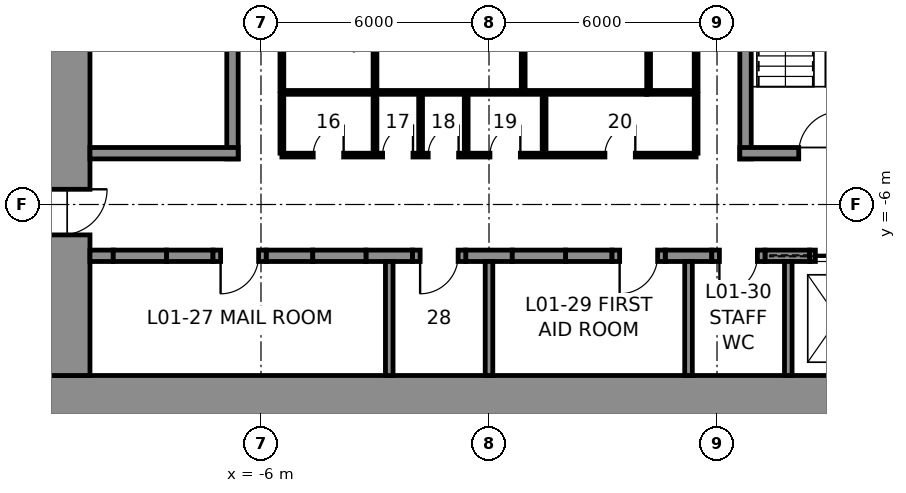
"""IFC4 building model, lengths in metres.
Left out: names, types, materials, properties, quantities, classifications, styles, units other than length and angle.
Written with IfcOpenShell. Run it as: python <this file> out.ifc"""

import sys

from ifc_helpers import new_model, si_unit, direction, frame, frame_2d, origin, place, context, subcontext, project, spatial, rectangle, extrude, element, fill, save


model = new_model("IFC4")
c1 = context("Model", 3, precision=1e-05, world=origin(), true_north=direction((0.0, 1.0)))
c2 = subcontext(c1, "Body", "Model", "MODEL_VIEW")
j1 = project(units=[si_unit("LENGTHUNIT", "METRE"), si_unit("PLANEANGLEUNIT", "RADIAN")], contexts=[c1])
p1 = place(None, origin())
s1 = spatial("IfcSite", under=j1, at=p1, CompositionType="ELEMENT")
p2 = place(p1, origin())
s2 = spatial("IfcBuilding", under=s1, at=p2, CompositionType="ELEMENT")
p3 = place(p2, frame((0.0, 0.0, 6.0)))
s3 = spatial("IfcBuildingStorey", under=s2, at=p3, CompositionType="ELEMENT", Elevation=6.0)
p4 = place(p3, frame((12.0, -11.25, 0.0), z_axis=(0.0, 0.0, 1.0), x_axis=(-1.0, 0.0, 0.0)))
e1 = element("IfcWall", 1, at=p4, inside=s3, PredefinedType="SHEAR", context=c2, shape_type="SweptSolid", body=[
    extrude(rectangle(XDim=24.0, YDim=1.5, at=frame_2d((12.0, 0.0))), origin(), (0.0, 0.0, 1.0), 5.0),
])
p5 = place(p3, frame((-11.25, -10.5, 0.0), z_axis=(0.0, 0.0, 1.0), x_axis=(0.0, 1.0, 0.0)))
e2 = element("IfcWall", 2, at=p5, inside=s3, PredefinedType="SHEAR", context=c2, shape_type="SweptSolid", body=[
    extrude(rectangle(XDim=21.0, YDim=1.5, at=frame_2d((10.5, 0.0))), origin(), (0.0, 0.0, 1.0), 5.0),
])
p6 = place(p5, frame((16.1, 0.0, 0.0)))
e3 = element("IfcOpeningElement", 3, at=p6, cuts=e2, PredefinedType="OPENING", context=c2, shape_type="SweptSolid", body=[
    extrude(rectangle(XDim=1.2, YDim=2.3, at=frame_2d((0.6, 1.15))), frame((0.0, 0.76, 0.0), z_axis=(0.0, -1.0, 0.0), x_axis=(1.0, 0.0, 0.0)), (0.0, 0.0, 1.0), 1.52),
])
p7 = place(p5, frame((3.7, 0.0, 0.0)))
e4 = element("IfcOpeningElement", 4, at=p7, cuts=e2, PredefinedType="OPENING", context=c2, shape_type="SweptSolid", body=[
    extrude(rectangle(XDim=1.2, YDim=2.3, at=frame_2d((0.6, 1.15))), frame((0.0, 0.76, 0.0), z_axis=(0.0, -1.0, 0.0), x_axis=(1.0, 0.0, 0.0)), (0.0, 0.0, 1.0), 1.52),
])
p8 = place(p3, frame((-10.5, -7.35, 0.0), z_axis=(0.0, 0.0, 1.0), x_axis=(1.0, 0.0, 0.0)))
e5 = element("IfcWall", 5, at=p8, inside=s3, PredefinedType="SHEAR", context=c2, shape_type="SweptSolid", body=[
    extrude(rectangle(XDim=0.613, YDim=0.3, at=frame_2d((0.306, 0.0))), origin(), (0.0, 0.0, 1.0), 5.0),
])
for number, where, z_axis, x_axis in (
    (6, (-8.488, -7.35, 0.0), (0.0, 0.0, 1.0), (1.0, 0.0, 0.0)),
    (7, (-5.863, -7.35, 0.0), (0.0, 0.0, 1.0), (1.0, 0.0, 0.0)),
    (8, (-3.238, -7.35, 0.0), (0.0, 0.0, 1.0), (1.0, 0.0, 0.0)),
    (9, (-0.613, -7.35, 0.0), (0.0, 0.0, 1.0), (1.0, 0.0, 0.0)),
    (10, (2.012, -7.35, 0.0), (0.0, 0.0, 1.0), (1.0, 0.0, 0.0)),
    (11, (4.637, -7.35, 0.0), (0.0, 0.0, 1.0), (1.0, 0.0, 0.0)),
):
    element("IfcWall", number, at=place(p3, frame(where, z_axis=z_axis, x_axis=x_axis)), inside=s3, PredefinedType="SHEAR", context=c2, shape_type="SweptSolid", body=[
        extrude(rectangle(XDim=1.225, YDim=0.3, at=frame_2d((0.613, 0.0))), origin(), (0.0, 0.0, 1.0), 5.0),
    ])
p9 = place(p3, frame((7.262, -7.35, 0.0), z_axis=(0.0, 0.0, 1.0), x_axis=(1.0, 0.0, 0.0)))
e12 = element("IfcWall", 12, at=p9, inside=s3, PredefinedType="SHEAR", context=c2, shape_type="SweptSolid", body=[
    extrude(rectangle(XDim=1.175, YDim=0.3, at=frame_2d((0.587, 0.0))), origin(), (0.0, 0.0, 1.0), 5.0),
])
p10 = place(p3, frame((-9.887, -7.35, 0.0), z_axis=(0.0, 0.0, 1.0), x_axis=(1.0, 0.0, 0.0)))
e13 = element("IfcWall", 13, at=p10, inside=s3, PredefinedType="PARTITIONING", context=c2, shape_type="SweptSolid", body=[
    extrude(rectangle(XDim=1.4, YDim=0.3, at=frame_2d((0.7, 0.0))), origin(), (0.0, 0.0, 1.0), 5.0),
])
p11 = place(p3, frame((-7.262, -7.35, 0.0), z_axis=(0.0, 0.0, 1.0), x_axis=(1.0, 0.0, 0.0)))
e14 = element("IfcWall", 14, at=p11, inside=s3, PredefinedType="PARTITIONING", context=c2, shape_type="SweptSolid", body=[
    extrude(rectangle(XDim=1.4, YDim=0.3, at=frame_2d((0.7, 0.0))), origin(), (0.0, 0.0, 1.0), 5.0),
])
p12 = place(p11, frame((0.2, 0.0, 0.0)))
e15 = element("IfcOpeningElement", 15, at=p12, cuts=e14, PredefinedType="OPENING", context=c2, shape_type="SweptSolid", body=[
    extrude(rectangle(XDim=1.0, YDim=2.3, at=frame_2d((0.5, 1.15))), frame((0.0, 0.16, 0.0), z_axis=(0.0, -1.0, 0.0), x_axis=(1.0, 0.0, 0.0)), (0.0, 0.0, 1.0), 0.32),
])
p13 = place(p3, frame((-4.637, -7.35, 0.0), z_axis=(0.0, 0.0, 1.0), x_axis=(1.0, 0.0, 0.0)))
e16 = element("IfcWall", 16, at=p13, inside=s3, PredefinedType="PARTITIONING", context=c2, shape_type="SweptSolid", body=[
    extrude(rectangle(XDim=1.4, YDim=0.3, at=frame_2d((0.7, 0.0))), origin(), (0.0, 0.0, 1.0), 5.0),
])
p14 = place(p3, frame((-2.012, -7.35, 0.0), z_axis=(0.0, 0.0, 1.0), x_axis=(1.0, 0.0, 0.0)))
e17 = element("IfcWall", 17, at=p14, inside=s3, PredefinedType="PARTITIONING", context=c2, shape_type="SweptSolid", body=[
    extrude(rectangle(XDim=1.4, YDim=0.3, at=frame_2d((0.7, 0.0))), origin(), (0.0, 0.0, 1.0), 5.0),
])
p15 = place(p14, frame((0.2, 0.0, 0.0)))
e18 = element("IfcOpeningElement", 18, at=p15, cuts=e17, PredefinedType="OPENING", context=c2, shape_type="SweptSolid", body=[
    extrude(rectangle(XDim=1.0, YDim=2.3, at=frame_2d((0.5, 1.15))), frame((0.0, 0.16, 0.0), z_axis=(0.0, -1.0, 0.0), x_axis=(1.0, 0.0, 0.0)), (0.0, 0.0, 1.0), 0.32),
])
p16 = place(p3, frame((0.613, -7.35, 0.0), z_axis=(0.0, 0.0, 1.0), x_axis=(1.0, 0.0, 0.0)))
e19 = element("IfcWall", 19, at=p16, inside=s3, PredefinedType="PARTITIONING", context=c2, shape_type="SweptSolid", body=[
    extrude(rectangle(XDim=1.4, YDim=0.3, at=frame_2d((0.7, 0.0))), origin(), (0.0, 0.0, 1.0), 5.0),
])
p17 = place(p3, frame((3.238, -7.35, 0.0), z_axis=(0.0, 0.0, 1.0), x_axis=(1.0, 0.0, 0.0)))
e20 = element("IfcWall", 20, at=p17, inside=s3, PredefinedType="PARTITIONING", context=c2, shape_type="SweptSolid", body=[
    extrude(rectangle(XDim=1.4, YDim=0.3, at=frame_2d((0.7, 0.0))), origin(), (0.0, 0.0, 1.0), 5.0),
])
p18 = place(p17, frame((0.2, 0.0, 0.0)))
e21 = element("IfcOpeningElement", 21, at=p18, cuts=e20, PredefinedType="OPENING", context=c2, shape_type="SweptSolid", body=[
    extrude(rectangle(XDim=1.0, YDim=2.3, at=frame_2d((0.5, 1.15))), frame((0.0, 0.16, 0.0), z_axis=(0.0, -1.0, 0.0), x_axis=(1.0, 0.0, 0.0)), (0.0, 0.0, 1.0), 0.32),
])
p19 = place(p3, frame((5.863, -7.35, 0.0), z_axis=(0.0, 0.0, 1.0), x_axis=(1.0, 0.0, 0.0)))
e22 = element("IfcWall", 22, at=p19, inside=s3, PredefinedType="PARTITIONING", context=c2, shape_type="SweptSolid", body=[
    extrude(rectangle(XDim=1.4, YDim=0.3, at=frame_2d((0.7, 0.0))), origin(), (0.0, 0.0, 1.0), 5.0),
])
p20 = place(p19, frame((0.2, 0.0, 0.0)))
e23 = element("IfcOpeningElement", 23, at=p20, cuts=e22, PredefinedType="OPENING", context=c2, shape_type="SweptSolid", body=[
    extrude(rectangle(XDim=1.0, YDim=2.3, at=frame_2d((0.5, 1.15))), frame((0.0, 0.16, 0.0), z_axis=(0.0, -1.0, 0.0), x_axis=(1.0, 0.0, 0.0)), (0.0, 0.0, 1.0), 0.32),
])
p21 = place(p3, frame((8.438, -7.35, 0.0), z_axis=(0.0, 0.0, 1.0), x_axis=(1.0, 0.0, 0.0)))
e24 = element("IfcWall", 24, at=p21, inside=s3, PredefinedType="PARTITIONING", context=c2, shape_type="SweptSolid", body=[
    extrude(rectangle(XDim=1.5, YDim=0.3, at=frame_2d((0.75, 0.0))), origin(), (0.0, 0.0, 1.0), 5.0),
])
p22 = place(p21, frame((0.15, 0.0, 0.0)))
e25 = element("IfcOpeningElement", 25, at=p22, cuts=e24, PredefinedType="OPENING", context=c2, shape_type="SweptSolid", body=[
    extrude(rectangle(XDim=1.2, YDim=2.3, at=frame_2d((0.6, 1.15))), frame((0.0, 0.16, 0.0), z_axis=(0.0, -1.0, 0.0), x_axis=(1.0, 0.0, 0.0)), (0.0, 0.0, 1.0), 0.32),
])
for number, where, z_axis, x_axis in (
    (26, (-2.625, -10.5, 0.0), (0.0, 0.0, 1.0), (0.0, 1.0, 0.0)),
    (27, (0.0, -10.5, 0.0), (0.0, 0.0, 1.0), (0.0, 1.0, 0.0)),
    (28, (5.25, -10.5, 0.0), (0.0, 0.0, 1.0), (0.0, 1.0, 0.0)),
    (29, (7.875, -10.5, 0.0), (0.0, 0.0, 1.0), (0.0, 1.0, 0.0)),
):
    element("IfcWall", number, at=place(p3, frame(where, z_axis=z_axis, x_axis=x_axis)), inside=s3, PredefinedType="PARTITIONING", context=c2, shape_type="SweptSolid", body=[
        extrude(rectangle(XDim=3.0, YDim=0.2, at=frame_2d((1.5, 0.0))), origin(), (0.0, 0.0, 1.0), 5.0),
    ])
p23 = place(p3, frame((-6.75, -4.8, 0.0), z_axis=(0.0, 0.0, 1.0), x_axis=(0.0, 1.0, 0.0)))
e30 = element("IfcWall", 30, at=p23, inside=s3, PredefinedType="SOLIDWALL", context=c2, shape_type="SweptSolid", body=[
    extrude(rectangle(XDim=9.6, YDim=0.3, at=frame_2d((4.8, 0.0))), origin(), (0.0, 0.0, 1.0), 4.75),
])
p24 = place(p3, frame((-6.6, -4.65, 0.0), z_axis=(0.0, 0.0, 1.0), x_axis=(-1.0, 0.0, 0.0)))
e31 = element("IfcWall", 31, at=p24, inside=s3, PredefinedType="SOLIDWALL", context=c2, shape_type="SweptSolid", body=[
    extrude(rectangle(XDim=3.9, YDim=0.3, at=frame_2d((1.95, 0.0))), origin(), (0.0, 0.0, 1.0), 4.75),
])
p25 = place(p3, frame((6.75, -4.8, 0.0), z_axis=(0.0, 0.0, 1.0), x_axis=(0.0, 1.0, 0.0)))
e32 = element("IfcWall", 32, at=p25, inside=s3, PredefinedType="SOLIDWALL", context=c2, shape_type="SweptSolid", body=[
    extrude(rectangle(XDim=9.6, YDim=0.3, at=frame_2d((4.8, 0.0))), origin(), (0.0, 0.0, 1.0), 4.75),
])
p26 = place(p3, frame((10.5, -4.65, 0.0), z_axis=(0.0, 0.0, 1.0), x_axis=(-1.0, 0.0, 0.0)))
e33 = element("IfcWall", 33, at=p26, inside=s3, PredefinedType="SOLIDWALL", context=c2, shape_type="SweptSolid", body=[
    extrude(rectangle(XDim=3.9, YDim=0.3, at=frame_2d((1.95, 0.0))), origin(), (0.0, 0.0, 1.0), 4.75),
])
p27 = place(p26, frame((1.25, 0.0, 0.0)))
e34 = element("IfcOpeningElement", 34, at=p27, cuts=e33, PredefinedType="OPENING", context=c2, shape_type="SweptSolid", body=[
    extrude(rectangle(XDim=1.1, YDim=2.3, at=frame_2d((0.55, 1.15))), frame((0.0, 0.16, 0.0), z_axis=(0.0, -1.0, 0.0), x_axis=(1.0, 0.0, 0.0)), (0.0, 0.0, 1.0), 0.32),
])
p28 = place(p3, frame((4.15, -3.05, 0.0), z_axis=(0.0, 0.0, 1.0), x_axis=(-1.0, 0.0, 0.0)))
e35 = element("IfcWall", 35, at=p28, inside=s3, PredefinedType="PARTITIONING", context=c2, shape_type="SweptSolid", body=[
    extrude(rectangle(XDim=9.6, YDim=0.1, at=frame_2d((4.8, 0.0))), origin(), (0.0, 0.0, 1.0), 4.75),
])
p29 = place(p3, frame((5.45, -3.05, 0.0), z_axis=(0.0, 0.0, 1.0), x_axis=(-1.0, 0.0, 0.0)))
e36 = element("IfcWall", 36, at=p29, inside=s3, PredefinedType="PARTITIONING", context=c2, shape_type="SweptSolid", body=[
    extrude(rectangle(XDim=1.3, YDim=0.1, at=frame_2d((0.65, 0.0))), origin(), (0.0, 0.0, 1.0), 4.75),
])
for number, where, z_axis, x_axis in (
    (37, (5.45, 3.0, 0.0), (0.0, 0.0, 1.0), (0.0, -1.0, 0.0)),
    (38, (-5.45, -3.0, 0.0), (0.0, 0.0, 1.0), (0.0, 1.0, 0.0)),
    (39, (-3.0, -3.0, 0.0), (0.0, 0.0, 1.0), (0.0, 1.0, 0.0)),
    (40, (0.9, -3.0, 0.0), (0.0, 0.0, 1.0), (0.0, 1.0, 0.0)),
    (41, (4.2, -3.0, 0.0), (0.0, 0.0, 1.0), (0.0, 1.0, 0.0)),
):
    element("IfcWall", number, at=place(p3, frame(where, z_axis=z_axis, x_axis=x_axis)), inside=s3, PredefinedType="PARTITIONING", context=c2, shape_type="SweptSolid", body=[
        extrude(rectangle(XDim=6.0, YDim=0.1, at=frame_2d((3.0, 0.0))), origin(), (0.0, 0.0, 1.0), 4.75),
    ])
p30 = place(p3, frame((5.45, -4.7, 0.0), z_axis=(0.0, 0.0, 1.0), x_axis=(-1.0, 0.0, 0.0)))
e42 = element("IfcWall", 42, at=p30, inside=s3, PredefinedType="PARTITIONING", context=c2, shape_type="SweptSolid", body=[
    extrude(rectangle(XDim=10.9, YDim=0.1, at=frame_2d((5.45, 0.0))), origin(), (0.0, 0.0, 1.0), 4.75),
])
p31 = place(p30, frame((9.275, 0.0, 0.0)))
e43 = element("IfcOpeningElement", 43, at=p31, cuts=e42, PredefinedType="OPENING", context=c2, shape_type="SweptSolid", body=[
    extrude(rectangle(XDim=0.8, YDim=2.3, at=frame_2d((0.4, 1.15))), frame((0.0, 0.06, 0.0), z_axis=(0.0, -1.0, 0.0), x_axis=(1.0, 0.0, 0.0)), (0.0, 0.0, 1.0), 0.12),
])
p32 = place(p30, frame((7.45, 0.0, 0.0)))
e44 = element("IfcOpeningElement", 44, at=p32, cuts=e42, PredefinedType="OPENING", context=c2, shape_type="SweptSolid", body=[
    extrude(rectangle(XDim=0.8, YDim=2.3, at=frame_2d((0.4, 1.15))), frame((0.0, 0.06, 0.0), z_axis=(0.0, -1.0, 0.0), x_axis=(1.0, 0.0, 0.0)), (0.0, 0.0, 1.0), 0.12),
])
p33 = place(p30, frame((6.25, 0.0, 0.0)))
e45 = element("IfcOpeningElement", 45, at=p33, cuts=e42, PredefinedType="OPENING", context=c2, shape_type="SweptSolid", body=[
    extrude(rectangle(XDim=0.8, YDim=2.3, at=frame_2d((0.4, 1.15))), frame((0.0, 0.06, 0.0), z_axis=(0.0, -1.0, 0.0), x_axis=(1.0, 0.0, 0.0)), (0.0, 0.0, 1.0), 0.12),
])
p34 = place(p30, frame((4.625, 0.0, 0.0)))
e46 = element("IfcOpeningElement", 46, at=p34, cuts=e42, PredefinedType="OPENING", context=c2, shape_type="SweptSolid", body=[
    extrude(rectangle(XDim=0.8, YDim=2.3, at=frame_2d((0.4, 1.15))), frame((0.0, 0.06, 0.0), z_axis=(0.0, -1.0, 0.0), x_axis=(1.0, 0.0, 0.0)), (0.0, 0.0, 1.0), 0.12),
])
p35 = place(p30, frame((1.6, 0.0, 0.0)))
e47 = element("IfcOpeningElement", 47, at=p35, cuts=e42, PredefinedType="OPENING", context=c2, shape_type="SweptSolid", body=[
    extrude(rectangle(XDim=0.8, YDim=2.3, at=frame_2d((0.4, 1.15))), frame((0.0, 0.06, 0.0), z_axis=(0.0, -1.0, 0.0), x_axis=(1.0, 0.0, 0.0)), (0.0, 0.0, 1.0), 0.12),
])
for number, where, z_axis, x_axis in (
    (48, (-5.45, -3.1, 0.0), (0.0, 0.0, 1.0), (0.0, -1.0, 0.0)),
    (49, (5.45, -3.1, 0.0), (0.0, 0.0, 1.0), (0.0, -1.0, 0.0)),
    (50, (-3.0, -3.1, 0.0), (0.0, 0.0, 1.0), (0.0, -1.0, 0.0)),
    (51, (-1.8, -3.1, 0.0), (0.0, 0.0, 1.0), (0.0, -1.0, 0.0)),
    (52, (-0.6, -3.1, 0.0), (0.0, 0.0, 1.0), (0.0, -1.0, 0.0)),
    (53, (1.45, -3.1, 0.0), (0.0, 0.0, 1.0), (0.0, -1.0, 0.0)),
):
    element("IfcWall", number, at=place(p3, frame(where, z_axis=z_axis, x_axis=x_axis)), inside=s3, PredefinedType="PARTITIONING", context=c2, shape_type="SweptSolid", body=[
        extrude(rectangle(XDim=1.55, YDim=0.1, at=frame_2d((0.775, 0.0))), origin(), (0.0, 0.0, 1.0), 4.75),
    ])
p36 = place(p27, frame((1.1, 0.0, 0.0), z_axis=(0.0, 0.0, 1.0), x_axis=(-1.0, 0.0, 0.0)))
e54 = element("IfcDoor", 54, at=p36, inside=s3, OperationType="SINGLE_SWING_RIGHT", PredefinedType="DOOR", context=c2, shape_type="SweptSolid", body=[
    extrude(rectangle(XDim=1.1, YDim=2.3, at=frame_2d((0.55, 1.15))), frame((0.0, 0.025, 0.0), z_axis=(0.0, -1.0, 0.0), x_axis=(1.0, 0.0, 0.0)), (0.0, 0.0, 1.0), 0.05),
])
fill(e34, e54)
p37 = place(p31, frame((0.8, 0.0, 0.0), z_axis=(0.0, 0.0, 1.0), x_axis=(-1.0, 0.0, 0.0)))
e55 = element("IfcDoor", 55, at=p37, inside=s3, OperationType="SINGLE_SWING_RIGHT", PredefinedType="DOOR", context=c2, shape_type="SweptSolid", body=[
    extrude(rectangle(XDim=0.8, YDim=2.3, at=frame_2d((0.4, 1.15))), frame((0.0, 0.025, 0.0), z_axis=(0.0, -1.0, 0.0), x_axis=(1.0, 0.0, 0.0)), (0.0, 0.0, 1.0), 0.05),
])
fill(e43, e55)
p38 = place(p32, frame((0.8, 0.0, 0.0), z_axis=(0.0, 0.0, 1.0), x_axis=(-1.0, 0.0, 0.0)))
e56 = element("IfcDoor", 56, at=p38, inside=s3, OperationType="SINGLE_SWING_RIGHT", PredefinedType="DOOR", context=c2, shape_type="SweptSolid", body=[
    extrude(rectangle(XDim=0.8, YDim=2.3, at=frame_2d((0.4, 1.15))), frame((0.0, 0.025, 0.0), z_axis=(0.0, -1.0, 0.0), x_axis=(1.0, 0.0, 0.0)), (0.0, 0.0, 1.0), 0.05),
])
fill(e44, e56)
p39 = place(p33, frame((0.8, 0.0, 0.0), z_axis=(0.0, 0.0, 1.0), x_axis=(-1.0, 0.0, 0.0)))
e57 = element("IfcDoor", 57, at=p39, inside=s3, OperationType="SINGLE_SWING_RIGHT", PredefinedType="DOOR", context=c2, shape_type="SweptSolid", body=[
    extrude(rectangle(XDim=0.8, YDim=2.3, at=frame_2d((0.4, 1.15))), frame((0.0, 0.025, 0.0), z_axis=(0.0, -1.0, 0.0), x_axis=(1.0, 0.0, 0.0)), (0.0, 0.0, 1.0), 0.05),
])
fill(e45, e57)
p40 = place(p34, frame((0.8, 0.0, 0.0), z_axis=(0.0, 0.0, 1.0), x_axis=(-1.0, 0.0, 0.0)))
e58 = element("IfcDoor", 58, at=p40, inside=s3, OperationType="SINGLE_SWING_RIGHT", PredefinedType="DOOR", context=c2, shape_type="SweptSolid", body=[
    extrude(rectangle(XDim=0.8, YDim=2.3, at=frame_2d((0.4, 1.15))), frame((0.0, 0.025, 0.0), z_axis=(0.0, -1.0, 0.0), x_axis=(1.0, 0.0, 0.0)), (0.0, 0.0, 1.0), 0.05),
])
fill(e46, e58)
p41 = place(p35, frame((0.8, 0.0, 0.0), z_axis=(0.0, 0.0, 1.0), x_axis=(-1.0, 0.0, 0.0)))
e59 = element("IfcDoor", 59, at=p41, inside=s3, OperationType="SINGLE_SWING_RIGHT", PredefinedType="DOOR", context=c2, shape_type="SweptSolid", body=[
    extrude(rectangle(XDim=0.8, YDim=2.3, at=frame_2d((0.4, 1.15))), frame((0.0, 0.025, 0.0), z_axis=(0.0, -1.0, 0.0), x_axis=(1.0, 0.0, 0.0)), (0.0, 0.0, 1.0), 0.05),
])
fill(e47, e59)
p42 = place(p12, frame((1.0, 0.0, 0.0), z_axis=(0.0, 0.0, 1.0), x_axis=(-1.0, 0.0, 0.0)))
e60 = element("IfcDoor", 60, at=p42, inside=s3, OperationType="SINGLE_SWING_RIGHT", PredefinedType="DOOR", context=c2, shape_type="SweptSolid", body=[
    extrude(rectangle(XDim=1.0, YDim=2.3, at=frame_2d((0.5, 1.15))), frame((0.0, 0.025, 0.0), z_axis=(0.0, -1.0, 0.0), x_axis=(1.0, 0.0, 0.0)), (0.0, 0.0, 1.0), 0.05),
])
fill(e15, e60)
p43 = place(p15, frame((1.0, 0.0, 0.0), z_axis=(0.0, 0.0, 1.0), x_axis=(-1.0, 0.0, 0.0)))
e61 = element("IfcDoor", 61, at=p43, inside=s3, OperationType="SINGLE_SWING_RIGHT", PredefinedType="DOOR", context=c2, shape_type="SweptSolid", body=[
    extrude(rectangle(XDim=1.0, YDim=2.3, at=frame_2d((0.5, 1.15))), frame((0.0, 0.025, 0.0), z_axis=(0.0, -1.0, 0.0), x_axis=(1.0, 0.0, 0.0)), (0.0, 0.0, 1.0), 0.05),
])
fill(e18, e61)
p44 = place(p18, frame((1.0, 0.0, 0.0), z_axis=(0.0, 0.0, 1.0), x_axis=(-1.0, 0.0, 0.0)))
e62 = element("IfcDoor", 62, at=p44, inside=s3, OperationType="SINGLE_SWING_RIGHT", PredefinedType="DOOR", context=c2, shape_type="SweptSolid", body=[
    extrude(rectangle(XDim=1.0, YDim=2.3, at=frame_2d((0.5, 1.15))), frame((0.0, 0.025, 0.0), z_axis=(0.0, -1.0, 0.0), x_axis=(1.0, 0.0, 0.0)), (0.0, 0.0, 1.0), 0.05),
])
fill(e21, e62)
p45 = place(p20, frame((1.0, 0.0, 0.0), z_axis=(0.0, 0.0, 1.0), x_axis=(-1.0, 0.0, 0.0)))
e63 = element("IfcDoor", 63, at=p45, inside=s3, OperationType="SINGLE_SWING_RIGHT", PredefinedType="DOOR", context=c2, shape_type="SweptSolid", body=[
    extrude(rectangle(XDim=1.0, YDim=2.3, at=frame_2d((0.5, 1.15))), frame((0.0, 0.025, 0.0), z_axis=(0.0, -1.0, 0.0), x_axis=(1.0, 0.0, 0.0)), (0.0, 0.0, 1.0), 0.05),
])
fill(e23, e63)
p46 = place(p7, frame((1.2, 0.0, 0.0), z_axis=(0.0, 0.0, 1.0), x_axis=(-1.0, 0.0, 0.0)))
e64 = element("IfcDoor", 64, at=p46, inside=s3, OperationType="SINGLE_SWING_LEFT", PredefinedType="DOOR", context=c2, shape_type="SweptSolid", body=[
    extrude(rectangle(XDim=1.2, YDim=2.3, at=frame_2d((0.6, 1.15))), frame((0.0, 0.025, 0.0), z_axis=(0.0, -1.0, 0.0), x_axis=(1.0, 0.0, 0.0)), (0.0, 0.0, 1.0), 0.05),
])
fill(e4, e64)
p47 = place(p22, origin())
e65 = element("IfcDoor", 65, at=p47, inside=s3, OperationType="SLIDING_TO_LEFT", PredefinedType="DOOR", context=c2, shape_type="SweptSolid", body=[
    extrude(rectangle(XDim=1.2, YDim=2.3, at=frame_2d((0.6, 1.15))), frame((0.0, 0.025, 0.0), z_axis=(0.0, -1.0, 0.0), x_axis=(1.0, 0.0, 0.0)), (0.0, 0.0, 1.0), 0.05),
])
fill(e25, e65)
save(model, sys.argv[1])
